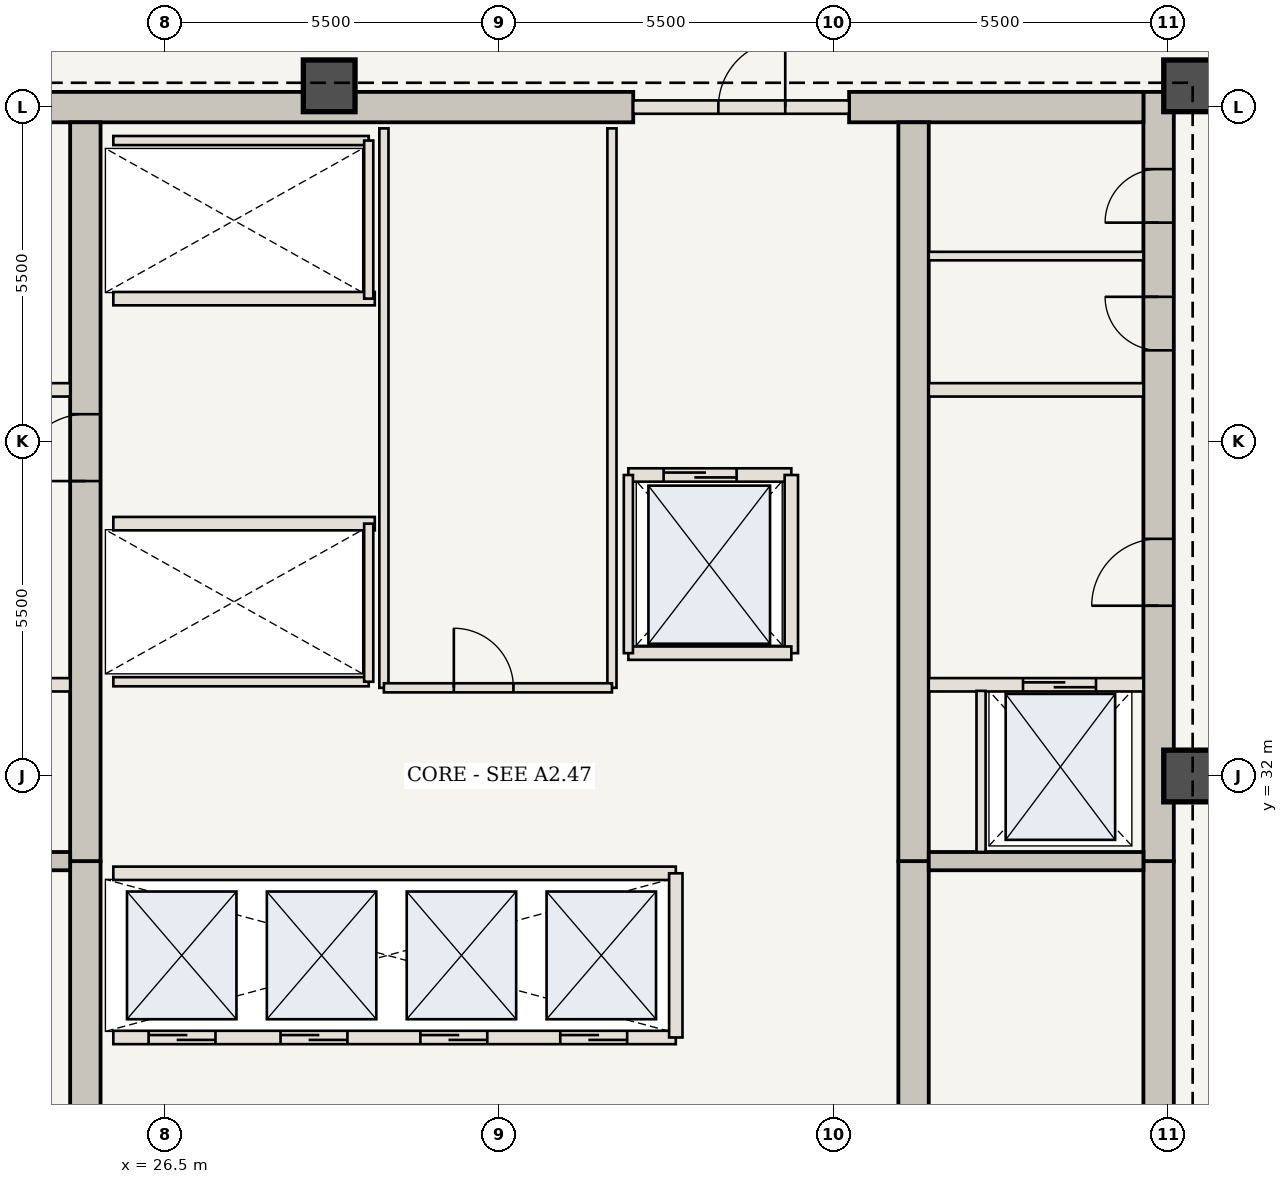
"""IFC4 building model, lengths in metres.
Left out: names, types, materials, properties, quantities, classifications, styles, units other than length and angle.
Written with IfcOpenShell. Run it as: python <this file> out.ifc"""

import sys

from ifc_helpers import new_model, si_unit, direction, frame, frame_2d, origin, origin_2d, place, context, subcontext, project, spatial, rectangle, extrude, element, fill, save


model = new_model("IFC4")
c1 = context("Model", 3, precision=1e-05, world=origin(), true_north=direction((0.0, 1.0)))
c2 = subcontext(c1, "Body", "Model", "MODEL_VIEW")
j1 = project(units=[si_unit("LENGTHUNIT", "METRE"), si_unit("PLANEANGLEUNIT", "RADIAN")], contexts=[c1])
p1 = place(None, origin())
s1 = spatial("IfcSite", under=j1, at=p1, CompositionType="ELEMENT")
p2 = place(p1, origin())
s2 = spatial("IfcBuilding", under=s1, at=p2, CompositionType="ELEMENT")
p3 = place(p2, frame((0.0, 0.0, 213.85)))
s3 = spatial("IfcBuildingStorey", under=s2, at=p3, CompositionType="ELEMENT", Elevation=213.85)
p4 = place(p3, frame((42.84, 20.7, 0.0), z_axis=(0.0, 0.0, 1.0), x_axis=(0.0, 1.0, 0.0)))
e1 = element("IfcWall", 1, at=p4, inside=s3, PredefinedType="SHEAR", context=c2, shape_type="SweptSolid", body=[
    extrude(rectangle(XDim=9.9, YDim=0.5, at=frame_2d((4.95, 0.0))), origin(), (0.0, 0.0, 1.0), 3.85),
])
p5 = place(p4, frame((1.05, 0.0, 0.0)))
e2 = element("IfcOpeningElement", 2, at=p5, cuts=e1, PredefinedType="OPENING", context=c2, shape_type="SweptSolid", body=[
    extrude(rectangle(XDim=1.15, YDim=2.15, at=frame_2d((0.575, 1.075))), frame((0.0, 0.26, 0.0), z_axis=(0.0, -1.0, 0.0), x_axis=(1.0, 0.0, 0.0)), (0.0, 0.0, 1.0), 0.52),
])
p6 = place(p3, frame((42.84, 30.6, 0.0), z_axis=(0.0, 0.0, 1.0), x_axis=(0.0, 1.0, 0.0)))
e3 = element("IfcWall", 3, at=p6, inside=s3, PredefinedType="SHEAR", context=c2, shape_type="SweptSolid", body=[
    extrude(rectangle(XDim=12.65, YDim=0.5, at=frame_2d((6.325, 0.0))), origin(), (0.0, 0.0, 1.0), 3.85),
])
p7 = place(p6, frame((4.2, 0.0, 0.0)))
e4 = element("IfcOpeningElement", 4, at=p7, cuts=e3, PredefinedType="OPENING", context=c2, shape_type="SweptSolid", body=[
    extrude(rectangle(XDim=1.1, YDim=2.15, at=frame_2d((0.55, 1.075))), frame((0.0, 0.26, 0.0), z_axis=(0.0, -1.0, 0.0), x_axis=(1.0, 0.0, 0.0)), (0.0, 0.0, 1.0), 0.52),
])
p8 = place(p6, frame((8.4, 0.0, 0.0)))
e5 = element("IfcOpeningElement", 5, at=p8, cuts=e3, PredefinedType="OPENING", context=c2, shape_type="SweptSolid", body=[
    extrude(rectangle(XDim=0.88, YDim=2.1, at=frame_2d((0.44, 1.05))), frame((0.0, 0.26, 0.0), z_axis=(0.0, -1.0, 0.0), x_axis=(1.0, 0.0, 0.0)), (0.0, 0.0, 1.0), 0.52),
])
p9 = place(p6, frame((10.5, 0.0, 0.0)))
e6 = element("IfcOpeningElement", 6, at=p9, cuts=e3, PredefinedType="OPENING", context=c2, shape_type="SweptSolid", body=[
    extrude(rectangle(XDim=0.88, YDim=2.1, at=frame_2d((0.44, 1.05))), frame((0.0, 0.26, 0.0), z_axis=(0.0, -1.0, 0.0), x_axis=(1.0, 0.0, 0.0)), (0.0, 0.0, 1.0), 0.52),
])
p10 = place(p3, frame((21.41, 43.0, 0.0), z_axis=(0.0, 0.0, 1.0), x_axis=(1.0, 0.0, 0.0)))
e7 = element("IfcWall", 7, at=p10, inside=s3, PredefinedType="SHEAR", context=c2, shape_type="SweptSolid", body=[
    extrude(rectangle(XDim=12.79, YDim=0.5, at=frame_2d((6.395, 0.0))), origin(), (0.0, 0.0, 1.0), 3.85),
])
p11 = place(p3, frame((37.75, 43.0, 0.0), z_axis=(0.0, 0.0, 1.0), x_axis=(1.0, 0.0, 0.0)))
e8 = element("IfcWall", 8, at=p11, inside=s3, PredefinedType="SHEAR", context=c2, shape_type="SweptSolid", body=[
    extrude(rectangle(XDim=4.84, YDim=0.5, at=frame_2d((2.42, 0.0))), origin(), (0.0, 0.0, 1.0), 3.85),
])
p12 = place(p3, frame((25.19, 21.2, 0.0), z_axis=(0.0, 0.0, 1.0), x_axis=(0.0, 1.0, 0.0)))
e9 = element("IfcWall", 9, at=p12, inside=s3, PredefinedType="SHEAR", context=c2, shape_type="SweptSolid", body=[
    extrude(rectangle(XDim=9.4, YDim=0.5, at=frame_2d((4.7, 0.0))), origin(), (0.0, 0.0, 1.0), 3.85),
])
p13 = place(p3, frame((25.19, 30.6, 0.0), z_axis=(0.0, 0.0, 1.0), x_axis=(0.0, 1.0, 0.0)))
e10 = element("IfcWall", 10, at=p13, inside=s3, PredefinedType="SHEAR", context=c2, shape_type="SweptSolid", body=[
    extrude(rectangle(XDim=12.15, YDim=0.5, at=frame_2d((6.075, 0.0))), origin(), (0.0, 0.0, 1.0), 3.85),
])
p14 = place(p13, frame((6.25, 0.0, 0.0)))
e11 = element("IfcOpeningElement", 11, at=p14, cuts=e10, PredefinedType="OPENING", context=c2, shape_type="SweptSolid", body=[
    extrude(rectangle(XDim=1.1, YDim=2.15, at=frame_2d((0.55, 1.075))), frame((0.0, 0.26, 0.0), z_axis=(0.0, -1.0, 0.0), x_axis=(1.0, 0.0, 0.0)), (0.0, 0.0, 1.0), 0.52),
])
p15 = place(p3, frame((38.81, 21.2, 0.0), z_axis=(0.0, 0.0, 1.0), x_axis=(0.0, 1.0, 0.0)))
e12 = element("IfcWall", 12, at=p15, inside=s3, PredefinedType="SHEAR", context=c2, shape_type="SweptSolid", body=[
    extrude(rectangle(XDim=9.4, YDim=0.5, at=frame_2d((4.7, 0.0))), origin(), (0.0, 0.0, 1.0), 3.85),
])
p16 = place(p3, frame((38.81, 30.6, 0.0), z_axis=(0.0, 0.0, 1.0), x_axis=(0.0, 1.0, 0.0)))
e13 = element("IfcWall", 13, at=p16, inside=s3, PredefinedType="SHEAR", context=c2, shape_type="SweptSolid", body=[
    extrude(rectangle(XDim=12.15, YDim=0.5, at=frame_2d((6.075, 0.0))), origin(), (0.0, 0.0, 1.0), 3.85),
])
for number, where, z_axis, x_axis in (
    (14, (43.35, 32.0, 0.0), (0.0, 0.0, 1.0), (1.0, 0.0, 0.0)),
    (15, (43.35, 43.35, 0.0), (0.0, 0.0, 1.0), (1.0, 0.0, 0.0)),
    (16, (29.2, 43.35, 0.0), (0.0, 0.0, 1.0), (1.0, 0.0, 0.0)),
):
    element("IfcColumn", number, at=place(p3, frame(where, z_axis=z_axis, x_axis=x_axis)), inside=s3, PredefinedType="COLUMN", context=c2, shape_type="SweptSolid", body=[
        extrude(rectangle(XDim=0.85, YDim=0.85, at=origin_2d()), origin(), (0.0, 0.0, 1.0), 3.85),
    ])
for number, where, z_axis, x_axis in (
    (17, (21.41, 30.6, 0.0), (0.0, 0.0, 1.0), (1.0, 0.0, 0.0)),
    (18, (39.06, 30.6, 0.0), (0.0, 0.0, 1.0), (1.0, 0.0, 0.0)),
):
    element("IfcWall", number, at=place(p3, frame(where, z_axis=z_axis, x_axis=x_axis)), inside=s3, PredefinedType="SHEAR", context=c2, shape_type="SweptSolid", body=[
        extrude(rectangle(XDim=3.53, YDim=0.3, at=frame_2d((1.765, 0.0))), origin(), (0.0, 0.0, 1.0), 3.685),
    ])
p17 = place(p3, frame((21.41, 33.5, 0.0), z_axis=(0.0, 0.0, 1.0), x_axis=(1.0, 0.0, 0.0)))
e19 = element("IfcWall", 19, at=p17, inside=s3, PredefinedType="STANDARD", context=c2, shape_type="SweptSolid", body=[
    extrude(rectangle(XDim=3.53, YDim=0.22, at=frame_2d((1.765, 0.0))), origin(), (0.0, 0.0, 1.0), 3.685),
])
p18 = place(p17, frame((0.75, 0.0, 0.0)))
e20 = element("IfcOpeningElement", 20, at=p18, cuts=e19, PredefinedType="OPENING", context=c2, shape_type="SweptSolid", body=[
    extrude(rectangle(XDim=1.2, YDim=2.2, at=frame_2d((0.6, 1.1))), frame((0.0, 0.12, 0.0), z_axis=(0.0, -1.0, 0.0), x_axis=(1.0, 0.0, 0.0)), (0.0, 0.0, 1.0), 0.24),
])
p19 = place(p3, frame((39.06, 33.5, 0.0), z_axis=(0.0, 0.0, 1.0), x_axis=(1.0, 0.0, 0.0)))
e21 = element("IfcWall", 21, at=p19, inside=s3, PredefinedType="STANDARD", context=c2, shape_type="SweptSolid", body=[
    extrude(rectangle(XDim=3.53, YDim=0.22, at=frame_2d((1.765, 0.0))), origin(), (0.0, 0.0, 1.0), 3.685),
])
p20 = place(p19, frame((1.55, 0.0, 0.0)))
e22 = element("IfcOpeningElement", 22, at=p20, cuts=e21, PredefinedType="OPENING", context=c2, shape_type="SweptSolid", body=[
    extrude(rectangle(XDim=1.2, YDim=2.2, at=frame_2d((0.6, 1.1))), frame((0.0, 0.12, 0.0), z_axis=(0.0, -1.0, 0.0), x_axis=(1.0, 0.0, 0.0)), (0.0, 0.0, 1.0), 0.24),
])
p21 = place(p3, frame((39.92, 30.75, 0.0), z_axis=(0.0, 0.0, 1.0), x_axis=(0.0, 1.0, 0.0)))
e23 = element("IfcWall", 23, at=p21, inside=s3, PredefinedType="STANDARD", context=c2, shape_type="SweptSolid", body=[
    extrude(rectangle(XDim=2.65, YDim=0.15, at=frame_2d((1.325, 0.0))), origin(), (0.0, 0.0, 1.0), 3.685),
])
for number, where, z_axis, x_axis in (
    (24, (21.41, 38.35, 0.0), (0.0, 0.0, 1.0), (1.0, 0.0, 0.0)),
    (25, (39.06, 38.35, 0.0), (0.0, 0.0, 1.0), (1.0, 0.0, 0.0)),
):
    element("IfcWall", number, at=place(p3, frame(where, z_axis=z_axis, x_axis=x_axis)), inside=s3, PredefinedType="STANDARD", context=c2, shape_type="SweptSolid", body=[
        extrude(rectangle(XDim=3.53, YDim=0.22, at=frame_2d((1.765, 0.0))), origin(), (0.0, 0.0, 1.0), 3.685),
    ])
p22 = place(p3, frame((39.06, 40.55, 0.0), z_axis=(0.0, 0.0, 1.0), x_axis=(1.0, 0.0, 0.0)))
e26 = element("IfcWall", 26, at=p22, inside=s3, PredefinedType="STANDARD", context=c2, shape_type="SweptSolid", body=[
    extrude(rectangle(XDim=3.53, YDim=0.14, at=frame_2d((1.765, 0.0))), origin(), (0.0, 0.0, 1.0), 3.685),
])
p23 = place(p3, frame((25.65, 27.7, 0.0), z_axis=(0.0, 0.0, 1.0), x_axis=(1.0, 0.0, 0.0)))
e27 = element("IfcWall", 27, at=p23, inside=s3, PredefinedType="STANDARD", context=c2, shape_type="SweptSolid", body=[
    extrude(rectangle(XDim=9.25, YDim=0.22, at=frame_2d((4.625, 0.0))), origin(), (0.0, 0.0, 1.0), 3.685),
])
p24 = place(p23, frame((0.58, 0.0, 0.0)))
e28 = element("IfcOpeningElement", 28, at=p24, cuts=e27, PredefinedType="OPENING", context=c2, shape_type="SweptSolid", body=[
    extrude(rectangle(XDim=1.1, YDim=2.15, at=frame_2d((0.55, 1.075))), frame((0.0, 0.12, 0.0), z_axis=(0.0, -1.0, 0.0), x_axis=(1.0, 0.0, 0.0)), (0.0, 0.0, 1.0), 0.24),
])
p25 = place(p23, frame((2.75, 0.0, 0.0)))
e29 = element("IfcOpeningElement", 29, at=p25, cuts=e27, PredefinedType="OPENING", context=c2, shape_type="SweptSolid", body=[
    extrude(rectangle(XDim=1.1, YDim=2.15, at=frame_2d((0.55, 1.075))), frame((0.0, 0.12, 0.0), z_axis=(0.0, -1.0, 0.0), x_axis=(1.0, 0.0, 0.0)), (0.0, 0.0, 1.0), 0.24),
])
p26 = place(p23, frame((5.05, 0.0, 0.0)))
e30 = element("IfcOpeningElement", 30, at=p26, cuts=e27, PredefinedType="OPENING", context=c2, shape_type="SweptSolid", body=[
    extrude(rectangle(XDim=1.1, YDim=2.15, at=frame_2d((0.55, 1.075))), frame((0.0, 0.12, 0.0), z_axis=(0.0, -1.0, 0.0), x_axis=(1.0, 0.0, 0.0)), (0.0, 0.0, 1.0), 0.24),
])
p27 = place(p23, frame((7.35, 0.0, 0.0)))
e31 = element("IfcOpeningElement", 31, at=p27, cuts=e27, PredefinedType="OPENING", context=c2, shape_type="SweptSolid", body=[
    extrude(rectangle(XDim=1.1, YDim=2.15, at=frame_2d((0.55, 1.075))), frame((0.0, 0.12, 0.0), z_axis=(0.0, -1.0, 0.0), x_axis=(1.0, 0.0, 0.0)), (0.0, 0.0, 1.0), 0.24),
])
p28 = place(p3, frame((25.65, 30.4, 0.0), z_axis=(0.0, 0.0, 1.0), x_axis=(1.0, 0.0, 0.0)))
e32 = element("IfcWall", 32, at=p28, inside=s3, PredefinedType="STANDARD", context=c2, shape_type="SweptSolid", body=[
    extrude(rectangle(XDim=9.25, YDim=0.22, at=frame_2d((4.625, 0.0))), origin(), (0.0, 0.0, 1.0), 3.685),
])
p29 = place(p3, frame((34.9, 27.7, 0.0), z_axis=(0.0, 0.0, 1.0), x_axis=(0.0, 1.0, 0.0)))
e33 = element("IfcWall", 33, at=p29, inside=s3, PredefinedType="STANDARD", context=c2, shape_type="SweptSolid", body=[
    extrude(rectangle(XDim=2.7, YDim=0.22, at=frame_2d((1.35, 0.0))), origin(), (0.0, 0.0, 1.0), 3.685),
])
p30 = place(p3, frame((25.65, 36.15, 0.0), z_axis=(0.0, 0.0, 1.0), x_axis=(1.0, 0.0, 0.0)))
e34 = element("IfcWall", 34, at=p30, inside=s3, PredefinedType="STANDARD", context=c2, shape_type="SweptSolid", body=[
    extrude(rectangle(XDim=4.3, YDim=0.22, at=frame_2d((2.15, 0.0))), origin(), (0.0, 0.0, 1.0), 3.685),
])
p31 = place(p3, frame((25.65, 33.55, 0.0), z_axis=(0.0, 0.0, 1.0), x_axis=(1.0, 0.0, 0.0)))
e35 = element("IfcWall", 35, at=p31, inside=s3, PredefinedType="STANDARD", context=c2, shape_type="SweptSolid", body=[
    extrude(rectangle(XDim=4.2, YDim=0.15, at=frame_2d((2.1, 0.0))), origin(), (0.0, 0.0, 1.0), 3.685),
])
p32 = place(p3, frame((29.85, 33.55, 0.0), z_axis=(0.0, 0.0, 1.0), x_axis=(0.0, 1.0, 0.0)))
e36 = element("IfcWall", 36, at=p32, inside=s3, PredefinedType="STANDARD", context=c2, shape_type="SweptSolid", body=[
    extrude(rectangle(XDim=2.6, YDim=0.15, at=frame_2d((1.3, 0.0))), origin(), (0.0, 0.0, 1.0), 3.685),
])
p33 = place(p3, frame((25.65, 39.85, 0.0), z_axis=(0.0, 0.0, 1.0), x_axis=(1.0, 0.0, 0.0)))
e37 = element("IfcWall", 37, at=p33, inside=s3, PredefinedType="STANDARD", context=c2, shape_type="SweptSolid", body=[
    extrude(rectangle(XDim=4.3, YDim=0.22, at=frame_2d((2.15, 0.0))), origin(), (0.0, 0.0, 1.0), 3.685),
])
p34 = place(p3, frame((25.65, 42.45, 0.0), z_axis=(0.0, 0.0, 1.0), x_axis=(1.0, 0.0, 0.0)))
e38 = element("IfcWall", 38, at=p34, inside=s3, PredefinedType="STANDARD", context=c2, shape_type="SweptSolid", body=[
    extrude(rectangle(XDim=4.2, YDim=0.15, at=frame_2d((2.1, 0.0))), origin(), (0.0, 0.0, 1.0), 3.685),
])
p35 = place(p3, frame((29.85, 39.85, 0.0), z_axis=(0.0, 0.0, 1.0), x_axis=(0.0, 1.0, 0.0)))
e39 = element("IfcWall", 39, at=p35, inside=s3, PredefinedType="STANDARD", context=c2, shape_type="SweptSolid", body=[
    extrude(rectangle(XDim=2.6, YDim=0.15, at=frame_2d((1.3, 0.0))), origin(), (0.0, 0.0, 1.0), 3.685),
])
for number, where, z_axis, x_axis in (
    (40, (30.1, 33.45, 0.0), (0.0, 0.0, 1.0), (0.0, 1.0, 0.0)),
    (41, (33.85, 33.45, 0.0), (0.0, 0.0, 1.0), (0.0, 1.0, 0.0)),
):
    element("IfcWall", number, at=place(p3, frame(where, z_axis=z_axis, x_axis=x_axis)), inside=s3, PredefinedType="STANDARD", context=c2, shape_type="SweptSolid", body=[
        extrude(rectangle(XDim=9.2, YDim=0.15, at=frame_2d((4.6, 0.0))), origin(), (0.0, 0.0, 1.0), 3.685),
    ])
p36 = place(p3, frame((30.1, 33.45, 0.0), z_axis=(0.0, 0.0, 1.0), x_axis=(1.0, 0.0, 0.0)))
e42 = element("IfcWall", 42, at=p36, inside=s3, PredefinedType="STANDARD", context=c2, shape_type="SweptSolid", body=[
    extrude(rectangle(XDim=3.75, YDim=0.15, at=frame_2d((1.875, 0.0))), origin(), (0.0, 0.0, 1.0), 3.685),
])
p37 = place(p36, frame((1.15, 0.0, 0.0)))
e43 = element("IfcOpeningElement", 43, at=p37, cuts=e42, PredefinedType="OPENING", context=c2, shape_type="SweptSolid", body=[
    extrude(rectangle(XDim=0.98, YDim=2.2, at=frame_2d((0.49, 1.1))), frame((0.0, 0.085, 0.0), z_axis=(0.0, -1.0, 0.0), x_axis=(1.0, 0.0, 0.0)), (0.0, 0.0, 1.0), 0.17),
])
p38 = place(p3, frame((34.2, 43.0, 0.0), z_axis=(0.0, 0.0, 1.0), x_axis=(1.0, 0.0, 0.0)))
e44 = element("IfcWall", 44, at=p38, inside=s3, PredefinedType="STANDARD", context=c2, shape_type="SweptSolid", body=[
    extrude(rectangle(XDim=3.55, YDim=0.22, at=frame_2d((1.775, 0.0))), origin(), (0.0, 0.0, 1.0), 3.685),
])
p39 = place(p38, frame((1.4, 0.0, 0.0)))
e45 = element("IfcOpeningElement", 45, at=p39, cuts=e44, PredefinedType="OPENING", context=c2, shape_type="SweptSolid", body=[
    extrude(rectangle(XDim=1.1, YDim=2.15, at=frame_2d((0.55, 1.075))), frame((0.0, 0.12, 0.0), z_axis=(0.0, -1.0, 0.0), x_axis=(1.0, 0.0, 0.0)), (0.0, 0.0, 1.0), 0.24),
])
p40 = place(p3, frame((34.12, 36.95, 0.0), z_axis=(0.0, 0.0, 1.0), x_axis=(1.0, 0.0, 0.0)))
e46 = element("IfcWall", 46, at=p40, inside=s3, PredefinedType="STANDARD", context=c2, shape_type="SweptSolid", body=[
    extrude(rectangle(XDim=2.68, YDim=0.22, at=frame_2d((1.34, 0.0))), origin(), (0.0, 0.0, 1.0), 3.685),
])
p41 = place(p40, frame((0.58, 0.0, 0.0)))
e47 = element("IfcOpeningElement", 47, at=p41, cuts=e46, PredefinedType="OPENING", context=c2, shape_type="SweptSolid", body=[
    extrude(rectangle(XDim=1.2, YDim=2.2, at=frame_2d((0.6, 1.1))), frame((0.0, 0.12, 0.0), z_axis=(0.0, -1.0, 0.0), x_axis=(1.0, 0.0, 0.0)), (0.0, 0.0, 1.0), 0.24),
])
p42 = place(p3, frame((36.8, 34.02, 0.0), z_axis=(0.0, 0.0, 1.0), x_axis=(0.0, 1.0, 0.0)))
e48 = element("IfcWall", 48, at=p42, inside=s3, PredefinedType="STANDARD", context=c2, shape_type="SweptSolid", body=[
    extrude(rectangle(XDim=2.93, YDim=0.22, at=frame_2d((1.465, 0.0))), origin(), (0.0, 0.0, 1.0), 3.685),
])
p43 = place(p3, frame((34.12, 34.02, 0.0), z_axis=(0.0, 0.0, 1.0), x_axis=(1.0, 0.0, 0.0)))
e49 = element("IfcWall", 49, at=p43, inside=s3, PredefinedType="STANDARD", context=c2, shape_type="SweptSolid", body=[
    extrude(rectangle(XDim=2.68, YDim=0.22, at=frame_2d((1.34, 0.0))), origin(), (0.0, 0.0, 1.0), 3.685),
])
p44 = place(p3, frame((34.12, 34.02, 0.0), z_axis=(0.0, 0.0, 1.0), x_axis=(0.0, 1.0, 0.0)))
e50 = element("IfcWall", 50, at=p44, inside=s3, PredefinedType="STANDARD", context=c2, shape_type="SweptSolid", body=[
    extrude(rectangle(XDim=2.93, YDim=0.15, at=frame_2d((1.465, 0.0))), origin(), (0.0, 0.0, 1.0), 3.685),
])
p45 = place(p7, origin())
e51 = element("IfcDoor", 51, at=p45, inside=s3, OperationType="SINGLE_SWING_LEFT", PredefinedType="DOOR", context=c2, shape_type="SweptSolid", body=[
    extrude(rectangle(XDim=1.1, YDim=2.15, at=frame_2d((0.55, 1.075))), frame((0.0, 0.025, 0.0), z_axis=(0.0, -1.0, 0.0), x_axis=(1.0, 0.0, 0.0)), (0.0, 0.0, 1.0), 0.05),
])
fill(e4, e51)
p46 = place(p14, origin())
e52 = element("IfcDoor", 52, at=p46, inside=s3, OperationType="SINGLE_SWING_LEFT", PredefinedType="DOOR", context=c2, shape_type="SweptSolid", body=[
    extrude(rectangle(XDim=1.1, YDim=2.15, at=frame_2d((0.55, 1.075))), frame((0.0, 0.025, 0.0), z_axis=(0.0, -1.0, 0.0), x_axis=(1.0, 0.0, 0.0)), (0.0, 0.0, 1.0), 0.05),
])
fill(e11, e52)
p47 = place(p8, origin())
e53 = element("IfcDoor", 53, at=p47, inside=s3, OperationType="SINGLE_SWING_RIGHT", PredefinedType="DOOR", context=c2, shape_type="SweptSolid", body=[
    extrude(rectangle(XDim=0.88, YDim=2.1, at=frame_2d((0.44, 1.05))), frame((0.0, 0.025, 0.0), z_axis=(0.0, -1.0, 0.0), x_axis=(1.0, 0.0, 0.0)), (0.0, 0.0, 1.0), 0.05),
])
fill(e5, e53)
p48 = place(p9, origin())
e54 = element("IfcDoor", 54, at=p48, inside=s3, OperationType="SINGLE_SWING_LEFT", PredefinedType="DOOR", context=c2, shape_type="SweptSolid", body=[
    extrude(rectangle(XDim=0.88, YDim=2.1, at=frame_2d((0.44, 1.05))), frame((0.0, 0.025, 0.0), z_axis=(0.0, -1.0, 0.0), x_axis=(1.0, 0.0, 0.0)), (0.0, 0.0, 1.0), 0.05),
])
fill(e6, e54)
p49 = place(p20, origin())
e55 = element("IfcDoor", 55, at=p49, inside=s3, OperationType="DOUBLE_DOOR_SLIDING", PredefinedType="DOOR", context=c2, shape_type="SweptSolid", body=[
    extrude(rectangle(XDim=1.2, YDim=2.2, at=frame_2d((0.6, 1.1))), frame((0.0, 0.025, 0.0), z_axis=(0.0, -1.0, 0.0), x_axis=(1.0, 0.0, 0.0)), (0.0, 0.0, 1.0), 0.05),
])
fill(e22, e55)
p50 = place(p24, origin())
e56 = element("IfcDoor", 56, at=p50, inside=s3, OperationType="DOUBLE_DOOR_SLIDING", PredefinedType="DOOR", context=c2, shape_type="SweptSolid", body=[
    extrude(rectangle(XDim=1.1, YDim=2.15, at=frame_2d((0.55, 1.075))), frame((0.0, 0.025, 0.0), z_axis=(0.0, -1.0, 0.0), x_axis=(1.0, 0.0, 0.0)), (0.0, 0.0, 1.0), 0.05),
])
fill(e28, e56)
p51 = place(p25, origin())
e57 = element("IfcDoor", 57, at=p51, inside=s3, OperationType="DOUBLE_DOOR_SLIDING", PredefinedType="DOOR", context=c2, shape_type="SweptSolid", body=[
    extrude(rectangle(XDim=1.1, YDim=2.15, at=frame_2d((0.55, 1.075))), frame((0.0, 0.025, 0.0), z_axis=(0.0, -1.0, 0.0), x_axis=(1.0, 0.0, 0.0)), (0.0, 0.0, 1.0), 0.05),
])
fill(e29, e57)
p52 = place(p26, origin())
e58 = element("IfcDoor", 58, at=p52, inside=s3, OperationType="DOUBLE_DOOR_SLIDING", PredefinedType="DOOR", context=c2, shape_type="SweptSolid", body=[
    extrude(rectangle(XDim=1.1, YDim=2.15, at=frame_2d((0.55, 1.075))), frame((0.0, 0.025, 0.0), z_axis=(0.0, -1.0, 0.0), x_axis=(1.0, 0.0, 0.0)), (0.0, 0.0, 1.0), 0.05),
])
fill(e30, e58)
p53 = place(p27, origin())
e59 = element("IfcDoor", 59, at=p53, inside=s3, OperationType="DOUBLE_DOOR_SLIDING", PredefinedType="DOOR", context=c2, shape_type="SweptSolid", body=[
    extrude(rectangle(XDim=1.1, YDim=2.15, at=frame_2d((0.55, 1.075))), frame((0.0, 0.025, 0.0), z_axis=(0.0, -1.0, 0.0), x_axis=(1.0, 0.0, 0.0)), (0.0, 0.0, 1.0), 0.05),
])
fill(e31, e59)
p54 = place(p37, origin())
e60 = element("IfcDoor", 60, at=p54, inside=s3, OperationType="SINGLE_SWING_LEFT", PredefinedType="DOOR", context=c2, shape_type="SweptSolid", body=[
    extrude(rectangle(XDim=0.98, YDim=2.2, at=frame_2d((0.49, 1.1))), frame((0.0, 0.025, 0.0), z_axis=(0.0, -1.0, 0.0), x_axis=(1.0, 0.0, 0.0)), (0.0, 0.0, 1.0), 0.05),
])
fill(e43, e60)
p55 = place(p39, origin())
e61 = element("IfcDoor", 61, at=p55, inside=s3, OperationType="SINGLE_SWING_RIGHT", PredefinedType="DOOR", context=c2, shape_type="SweptSolid", body=[
    extrude(rectangle(XDim=1.1, YDim=2.15, at=frame_2d((0.55, 1.075))), frame((0.0, 0.025, 0.0), z_axis=(0.0, -1.0, 0.0), x_axis=(1.0, 0.0, 0.0)), (0.0, 0.0, 1.0), 0.05),
])
fill(e45, e61)
p56 = place(p41, origin())
e62 = element("IfcDoor", 62, at=p56, inside=s3, OperationType="DOUBLE_DOOR_SLIDING", PredefinedType="DOOR", context=c2, shape_type="SweptSolid", body=[
    extrude(rectangle(XDim=1.2, YDim=2.2, at=frame_2d((0.6, 1.1))), frame((0.0, 0.025, 0.0), z_axis=(0.0, -1.0, 0.0), x_axis=(1.0, 0.0, 0.0)), (0.0, 0.0, 1.0), 0.05),
])
fill(e47, e62)
save(model, sys.argv[1])
